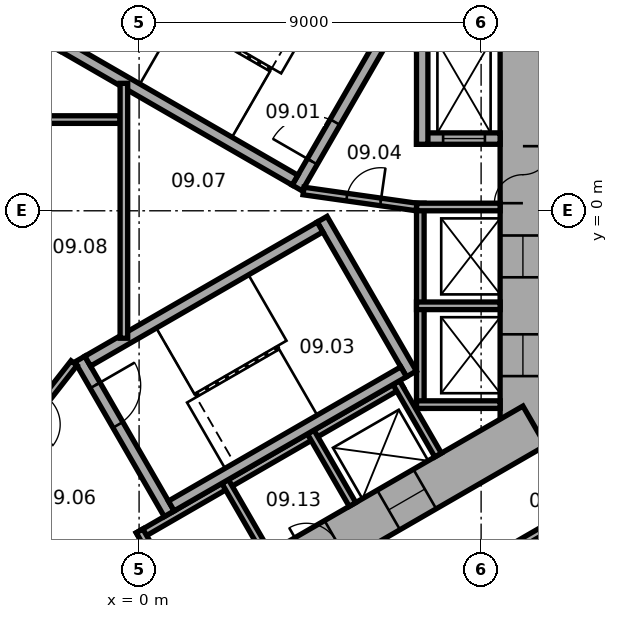
"""IFC4 building model, lengths in metres.
Left out: names, types, materials, properties, quantities, classifications, styles, units other than length and angle.
Written with IfcOpenShell. Run it as: python <this file> out.ifc"""

import sys

from ifc_helpers import new_model, si_unit, direction, frame, frame_2d, origin, place, context, subcontext, project, spatial, rectangle, extrude, element, fill, save


model = new_model("IFC4")
c1 = context("Model", 3, precision=1e-05, world=origin(), true_north=direction((0.0, 1.0)))
c2 = subcontext(c1, "Body", "Model", "MODEL_VIEW")
j1 = project(units=[si_unit("LENGTHUNIT", "METRE"), si_unit("PLANEANGLEUNIT", "RADIAN")], contexts=[c1])
p1 = place(None, origin())
s1 = spatial("IfcSite", under=j1, at=p1, CompositionType="ELEMENT")
p2 = place(p1, origin())
s2 = spatial("IfcBuilding", under=s1, at=p2, CompositionType="ELEMENT")
p3 = place(p2, frame((0.0, 0.0, 50.6)))
s3 = spatial("IfcBuildingStorey", under=s2, at=p3, CompositionType="ELEMENT", Elevation=50.6)
p4 = place(p3, frame((10.1, -6.177, 0.0), z_axis=(0.0, 0.0, 1.0), x_axis=(0.0, 1.0, 0.0)))
e1 = element("IfcWall", 1, at=p4, inside=s3, PredefinedType="SHEAR", context=c2, shape_type="SweptSolid", body=[
    extrude(rectangle(XDim=12.355, YDim=1.2, at=frame_2d((6.177, 0.0))), origin(), (0.0, 0.0, 1.0), 3.3),
])
p5 = place(p4, frame((6.378, 0.0, 0.0)))
e2 = element("IfcOpeningElement", 2, at=p5, cuts=e1, PredefinedType="OPENING", context=c2, shape_type="SweptSolid", body=[
    extrude(rectangle(XDim=1.5, YDim=2.1, at=frame_2d((0.75, 1.05))), frame((0.0, 0.61, 0.0), z_axis=(0.0, -1.0, 0.0), x_axis=(1.0, 0.0, 0.0)), (0.0, 0.0, 1.0), 1.22),
])
p6 = place(p4, frame((1.828, 0.0, 0.0)))
e3 = element("IfcOpeningElement", 3, at=p6, cuts=e1, PredefinedType="OPENING", context=c2, shape_type="SweptSolid", body=[
    extrude(rectangle(XDim=1.1, YDim=2.1, at=frame_2d((0.55, 1.05))), frame((0.0, 0.61, 0.0), z_axis=(0.0, -1.0, 0.0), x_axis=(1.0, 0.0, 0.0)), (0.0, 0.0, 1.0), 1.22),
])
p7 = place(p4, frame((4.427, 0.0, 0.0)))
e4 = element("IfcOpeningElement", 4, at=p7, cuts=e1, PredefinedType="OPENING", context=c2, shape_type="SweptSolid", body=[
    extrude(rectangle(XDim=1.1, YDim=2.1, at=frame_2d((0.55, 1.05))), frame((0.0, 0.61, 0.0), z_axis=(0.0, -1.0, 0.0), x_axis=(1.0, 0.0, 0.0)), (0.0, 0.0, 1.0), 1.22),
])
p8 = place(p3, frame((-10.4, -5.658, 0.0), z_axis=(0.0, 0.0, 1.0), x_axis=(0.866021384402, -0.500006961711, 0.0)))
e5 = element("IfcWall", 5, at=p8, inside=s3, PredefinedType="SHEAR", context=c2, shape_type="SweptSolid", body=[
    extrude(rectangle(XDim=12.355, YDim=1.2, at=frame_2d((6.178, 0.0))), origin(), (0.0, 0.0, 1.0), 3.3),
])
p9 = place(p8, frame((6.378, 0.0, 0.0)))
e6 = element("IfcOpeningElement", 6, at=p9, cuts=e5, PredefinedType="OPENING", context=c2, shape_type="SweptSolid", body=[
    extrude(rectangle(XDim=1.5, YDim=2.1, at=frame_2d((0.75, 1.05))), frame((0.0, 0.61, 0.0), z_axis=(0.0, -1.0, 0.0), x_axis=(1.0, 0.0, 0.0)), (0.0, 0.0, 1.0), 1.22),
])
p10 = place(p8, frame((3.228, 0.0, 0.0)))
e7 = element("IfcOpeningElement", 7, at=p10, cuts=e5, PredefinedType="OPENING", context=c2, shape_type="SweptSolid", body=[
    extrude(rectangle(XDim=0.9, YDim=2.1, at=frame_2d((0.45, 1.05))), frame((0.0, 0.61, 0.0), z_axis=(0.0, -1.0, 0.0), x_axis=(1.0, 0.0, 0.0)), (0.0, 0.0, 1.0), 1.22),
])
p11 = place(p3, frame((-0.3, -11.836, 0.0), z_axis=(0.0, 0.0, 1.0), x_axis=(0.866021384402, 0.500006961711, 0.0)))
e8 = element("IfcWall", 8, at=p11, inside=s3, PredefinedType="SHEAR", context=c2, shape_type="SweptSolid", body=[
    extrude(rectangle(XDim=12.355, YDim=1.2, at=frame_2d((6.178, 0.0))), origin(), (0.0, 0.0, 1.0), 3.3),
])
p12 = place(p11, frame((2.828, 0.0, 0.0)))
e9 = element("IfcOpeningElement", 9, at=p12, cuts=e8, PredefinedType="OPENING", context=c2, shape_type="SweptSolid", body=[
    extrude(rectangle(XDim=0.9, YDim=2.1, at=frame_2d((0.45, 1.05))), frame((0.0, 0.61, 0.0), z_axis=(0.0, -1.0, 0.0), x_axis=(1.0, 0.0, 0.0)), (0.0, 0.0, 1.0), 1.22),
])
p13 = place(p11, frame((5.428, 0.0, 0.0)))
e10 = element("IfcOpeningElement", 10, at=p13, cuts=e8, PredefinedType="OPENING", context=c2, shape_type="SweptSolid", body=[
    extrude(rectangle(XDim=0.9, YDim=2.1, at=frame_2d((0.45, 1.05))), frame((0.0, 0.61, 0.0), z_axis=(0.0, -1.0, 0.0), x_axis=(1.0, 0.0, 0.0)), (0.0, 0.0, 1.0), 1.22),
])
p14 = place(p11, frame((7.928, 0.0, 0.0)))
e11 = element("IfcOpeningElement", 11, at=p14, cuts=e8, PredefinedType="OPENING", context=c2, shape_type="SweptSolid", body=[
    extrude(rectangle(XDim=1.1, YDim=2.1, at=frame_2d((0.55, 1.05))), frame((0.0, 0.61, 0.0), z_axis=(0.0, -1.0, 0.0), x_axis=(1.0, 0.0, 0.0)), (0.0, 0.0, 1.0), 1.22),
])
p15 = place(p3, frame((7.4, -5.2, 0.0), z_axis=(0.0, 0.0, 1.0), x_axis=(0.0, 1.0, 0.0)))
e12 = element("IfcWall", 12, at=p15, inside=s3, PredefinedType="PARTITIONING", context=c2, shape_type="SweptSolid", body=[
    extrude(rectangle(XDim=5.4, YDim=0.2, at=frame_2d((2.7, 0.0))), origin(), (0.0, 0.0, 1.0), 3.05),
])
for number, where, z_axis, x_axis in (
    (13, (7.3, -5.1, 0.0), (0.0, 0.0, 1.0), (1.0, 0.0, 0.0)),
    (14, (7.3, -2.5, 0.0), (0.0, 0.0, 1.0), (1.0, 0.0, 0.0)),
    (15, (7.3, 0.1, 0.0), (0.0, 0.0, 1.0), (1.0, 0.0, 0.0)),
):
    element("IfcWall", number, at=place(p3, frame(where, z_axis=z_axis, x_axis=x_axis)), inside=s3, PredefinedType="PARTITIONING", context=c2, shape_type="SweptSolid", body=[
        extrude(rectangle(XDim=2.2, YDim=0.2, at=frame_2d((1.1, 0.0))), origin(), (0.0, 0.0, 1.0), 3.05),
    ])
p16 = place(p3, frame((7.424, 4.259, 0.0), z_axis=(0.0, 0.0, 1.0), x_axis=(-0.866026010844, 0.49999894854, 0.0)))
e16 = element("IfcWall", 16, at=p16, inside=s3, PredefinedType="PARTITIONING", context=c2, shape_type="SweptSolid", body=[
    extrude(rectangle(XDim=8.0, YDim=0.2, at=frame_2d((4.0, 0.0))), origin(), (0.0, 0.0, 1.0), 3.05),
])
p17 = place(p3, frame((7.287, 4.222, 0.0), z_axis=(0.0, 0.0, 1.0), x_axis=(0.499946605688, 0.86605622881, 0.0)))
e17 = element("IfcWall", 17, at=p17, inside=s3, PredefinedType="PARTITIONING", context=c2, shape_type="SweptSolid", body=[
    extrude(rectangle(XDim=2.2, YDim=0.2, at=frame_2d((1.1, 0.0))), origin(), (0.0, 0.0, 1.0), 3.05),
])
p18 = place(p3, frame((-0.024, -8.559, 0.0), z_axis=(0.0, 0.0, 1.0), x_axis=(0.866026010844, 0.49999894854, 0.0)))
e18 = element("IfcWall", 18, at=p18, inside=s3, PredefinedType="PARTITIONING", context=c2, shape_type="SweptSolid", body=[
    extrude(rectangle(XDim=8.0, YDim=0.2, at=frame_2d((4.0, 0.0))), origin(), (0.0, 0.0, 1.0), 3.05),
])
for number, where, z_axis, x_axis in (
    (19, (0.013, -8.422, 0.0), (0.0, 0.0, 1.0), (0.5, -0.866, 0.0)),
    (20, (2.264, -7.122, 0.0), (0.0, 0.0, 1.0), (0.5, -0.866, 0.0)),
    (21, (4.516, -5.822, 0.0), (0.0, 0.0, 1.0), (0.5, -0.866, 0.0)),
    (22, (6.768, -4.522, 0.0), (0.0, 0.0, 1.0), (0.5, -0.866, 0.0)),
):
    element("IfcWall", number, at=place(p3, frame(where, z_axis=z_axis, x_axis=x_axis)), inside=s3, PredefinedType="PARTITIONING", context=c2, shape_type="SweptSolid", body=[
        extrude(rectangle(XDim=2.2, YDim=0.2, at=frame_2d((1.1, 0.0))), origin(), (0.0, 0.0, 1.0), 3.05),
    ])
p19 = place(p3, frame((4.158, 0.602, 0.0), z_axis=(0.0, 0.0, 1.0), x_axis=(0.499977259774, 0.866038532462, 0.0)))
e23 = element("IfcWall", 23, at=p19, inside=s3, PredefinedType="SHEAR", context=c2, shape_type="SweptSolid", body=[
    extrude(rectangle(XDim=4.7, YDim=0.3, at=frame_2d((2.35, 0.0))), origin(), (0.0, 0.0, 1.0), 3.05),
])
p20 = place(p19, frame((0.8, 0.0, 0.0)))
e24 = element("IfcOpeningElement", 24, at=p20, cuts=e23, PredefinedType="OPENING", context=c2, shape_type="SweptSolid", body=[
    extrude(rectangle(XDim=1.2, YDim=2.1, at=frame_2d((0.6, 1.05))), frame((0.0, 0.16, 0.0), z_axis=(0.0, -1.0, 0.0), x_axis=(1.0, 0.0, 0.0)), (0.0, 0.0, 1.0), 0.32),
])
p21 = place(p3, frame((4.103, 0.807, 0.0), z_axis=(0.0, 0.0, 1.0), x_axis=(-0.866027801685, 0.499995846692, 0.0)))
e25 = element("IfcWall", 25, at=p21, inside=s3, PredefinedType="SHEAR", context=c2, shape_type="SweptSolid", body=[
    extrude(rectangle(XDim=7.06, YDim=0.3, at=frame_2d((3.53, 0.0))), origin(), (0.0, 0.0, 1.0), 3.05),
])
p22 = place(p3, frame((-1.558, -3.902, 0.0), z_axis=(0.0, 0.0, 1.0), x_axis=(0.499977259774, -0.866038532462, 0.0)))
e26 = element("IfcWall", 26, at=p22, inside=s3, PredefinedType="SHEAR", context=c2, shape_type="SweptSolid", body=[
    extrude(rectangle(XDim=4.7, YDim=0.3, at=frame_2d((2.35, 0.0))), origin(), (0.0, 0.0, 1.0), 3.05),
])
p23 = place(p22, frame((0.8, 0.0, 0.0)))
e27 = element("IfcOpeningElement", 27, at=p23, cuts=e26, PredefinedType="OPENING", context=c2, shape_type="SweptSolid", body=[
    extrude(rectangle(XDim=1.2, YDim=2.1, at=frame_2d((0.6, 1.05))), frame((0.0, 0.16, 0.0), z_axis=(0.0, -1.0, 0.0), x_axis=(1.0, 0.0, 0.0)), (0.0, 0.0, 1.0), 0.32),
])
p24 = place(p3, frame((4.816, -0.222, 0.0), z_axis=(0.0, 0.0, 1.0), x_axis=(0.499977259774, -0.866038532462, 0.0)))
e28 = element("IfcWall", 28, at=p24, inside=s3, PredefinedType="SHEAR", context=c2, shape_type="SweptSolid", body=[
    extrude(rectangle(XDim=4.7, YDim=0.3, at=frame_2d((2.35, 0.0))), origin(), (0.0, 0.0, 1.0), 3.05),
])
for number, where, z_axis, x_axis in (
    (29, (-1.353, -3.957, 0.0), (0.0, 0.0, 1.0), (0.866, 0.5, 0.0)),
    (30, (0.847, -7.767, 0.0), (0.0, 0.0, 1.0), (0.866, 0.5, 0.0)),
):
    element("IfcWall", number, at=place(p3, frame(where, z_axis=z_axis, x_axis=x_axis)), inside=s3, PredefinedType="SHEAR", context=c2, shape_type="SweptSolid", body=[
        extrude(rectangle(XDim=7.06, YDim=0.3, at=frame_2d((3.53, 0.0))), origin(), (0.0, 0.0, 1.0), 3.05),
    ])
p25 = place(p3, frame((7.3, 1.9, 0.0), z_axis=(0.0, 0.0, 1.0), x_axis=(1.0, 0.0, 0.0)))
e31 = element("IfcWall", 31, at=p25, inside=s3, PredefinedType="SHEAR", context=c2, shape_type="SweptSolid", body=[
    extrude(rectangle(XDim=2.2, YDim=0.3, at=frame_2d((1.1, 0.0))), origin(), (0.0, 0.0, 1.0), 3.05),
])
p26 = place(p25, frame((0.7, 0.0, 0.0)))
e32 = element("IfcOpeningElement", 32, at=p26, cuts=e31, PredefinedType="OPENING", context=c2, shape_type="SweptSolid", body=[
    extrude(rectangle(XDim=1.1, YDim=2.1, at=frame_2d((0.55, 1.05))), frame((0.0, 0.16, 0.0), z_axis=(0.0, -1.0, 0.0), x_axis=(1.0, 0.0, 0.0)), (0.0, 0.0, 1.0), 0.32),
])
p27 = place(p3, frame((7.45, 1.75, 0.0), z_axis=(0.0, 0.0, 1.0), x_axis=(0.0, 1.0, 0.0)))
e33 = element("IfcWall", 33, at=p27, inside=s3, PredefinedType="SHEAR", context=c2, shape_type="SweptSolid", body=[
    extrude(rectangle(XDim=3.35, YDim=0.3, at=frame_2d((1.675, 0.0))), origin(), (0.0, 0.0, 1.0), 3.05),
])
p28 = place(p3, frame((4.327, 0.521, 0.0), z_axis=(0.0, 0.0, 1.0), x_axis=(0.990124376366, -0.14019172346, 0.0)))
e34 = element("IfcWall", 34, at=p28, inside=s3, PredefinedType="PARTITIONING", context=c2, shape_type="SweptSolid", body=[
    extrude(rectangle(XDim=3.002, YDim=0.2, at=frame_2d((1.501, 0.0))), origin(), (0.0, 0.0, 1.0), 3.05),
])
p29 = place(p28, frame((1.15, 0.0, 0.0)))
e35 = element("IfcOpeningElement", 35, at=p29, cuts=e34, PredefinedType="OPENING", context=c2, shape_type="SweptSolid", body=[
    extrude(rectangle(XDim=0.9, YDim=2.1, at=frame_2d((0.45, 1.05))), frame((0.0, 0.11, 0.0), z_axis=(0.0, -1.0, 0.0), x_axis=(1.0, 0.0, 0.0)), (0.0, 0.0, 1.0), 0.22),
])
p30 = place(p3, frame((-1.712, -4.008, 0.0), z_axis=(0.0, 0.0, 1.0), x_axis=(-0.616549420702, -0.787316208287, 0.0)))
e36 = element("IfcWall", 36, at=p30, inside=s3, PredefinedType="PARTITIONING", context=c2, shape_type="SweptSolid", body=[
    extrude(rectangle(XDim=3.002, YDim=0.2, at=frame_2d((1.501, 0.0))), origin(), (0.0, 0.0, 1.0), 3.05),
])
p31 = place(p30, frame((1.15, 0.0, 0.0)))
e37 = element("IfcOpeningElement", 37, at=p31, cuts=e36, PredefinedType="OPENING", context=c2, shape_type="SweptSolid", body=[
    extrude(rectangle(XDim=0.9, YDim=2.1, at=frame_2d((0.45, 1.05))), frame((0.0, 0.11, 0.0), z_axis=(0.0, -1.0, 0.0), x_axis=(1.0, 0.0, 0.0)), (0.0, 0.0, 1.0), 0.22),
])
p32 = place(p3, frame((-2.72, 2.4, 0.0), z_axis=(0.0, 0.0, 1.0), x_axis=(1.0, 0.0, 0.0)))
e38 = element("IfcWall", 38, at=p32, inside=s3, PredefinedType="PARTITIONING", context=c2, shape_type="SweptSolid", body=[
    extrude(rectangle(XDim=2.22, YDim=0.2, at=frame_2d((1.11, 0.0))), origin(), (0.0, 0.0, 1.0), 3.05),
])
p33 = place(p3, frame((-0.4, -3.353, 0.0), z_axis=(0.0, 0.0, 1.0), x_axis=(0.0, 1.0, 0.0)))
e39 = element("IfcWall", 39, at=p33, inside=s3, PredefinedType="PARTITIONING", context=c2, shape_type="SweptSolid", body=[
    extrude(rectangle(XDim=6.707, YDim=0.2, at=frame_2d((3.353, 0.0))), origin(), (0.0, 0.0, 1.0), 3.05),
])
p34 = place(p3, frame((-11.615, -7.843, 0.0), z_axis=(0.0, 0.0, 1.0), x_axis=(0.866026466995, -0.499998158461, 0.0)))
e40 = element("IfcWall", 40, at=p34, inside=s3, PredefinedType="PARTITIONING", context=c2, shape_type="SweptSolid", body=[
    extrude(rectangle(XDim=12.315, YDim=0.2, at=frame_2d((6.158, 0.0))), origin(), (0.0, 0.0, 1.0), 3.05),
])
p35 = place(p34, frame((1.665, 0.0, 0.0)))
e41 = element("IfcOpeningElement", 41, at=p35, cuts=e40, PredefinedType="OPENING", context=c2, shape_type="SweptSolid", body=[
    extrude(rectangle(XDim=0.9, YDim=2.1, at=frame_2d((0.45, 1.05))), frame((0.0, 0.11, 0.0), z_axis=(0.0, -1.0, 0.0), x_axis=(1.0, 0.0, 0.0)), (0.0, 0.0, 1.0), 0.22),
])
p36 = place(p34, frame((9.787, 0.0, 0.0)))
e42 = element("IfcOpeningElement", 42, at=p36, cuts=e40, PredefinedType="OPENING", context=c2, shape_type="SweptSolid", body=[
    extrude(rectangle(XDim=0.9, YDim=2.1, at=frame_2d((0.45, 1.05))), frame((0.0, 0.11, 0.0), z_axis=(0.0, -1.0, 0.0), x_axis=(1.0, 0.0, 0.0)), (0.0, 0.0, 1.0), 0.22),
])
p37 = place(p3, frame((9.852, -8.861, 0.0), z_axis=(0.0, 0.0, 1.0), x_axis=(0.866013291437, 0.500020978615, 0.0)))
e43 = element("IfcWall", 43, at=p37, inside=s3, PredefinedType="PARTITIONING", context=c2, shape_type="SweptSolid", body=[
    extrude(rectangle(XDim=2.077, YDim=0.2, at=frame_2d((1.038, 0.0))), origin(), (0.0, 0.0, 1.0), 3.05),
])
p38 = place(p5, origin())
e44 = element("IfcDoor", 44, at=p38, inside=s3, OperationType="DOUBLE_DOOR_SINGLE_SWING", PredefinedType="DOOR", context=c2, shape_type="SweptSolid", body=[
    extrude(rectangle(XDim=1.5, YDim=2.1, at=frame_2d((0.75, 1.05))), frame((0.0, 0.025, 0.0), z_axis=(0.0, -1.0, 0.0), x_axis=(1.0, 0.0, 0.0)), (0.0, 0.0, 1.0), 0.05),
])
fill(e2, e44)
p39 = place(p20, origin())
e45 = element("IfcDoor", 45, at=p39, inside=s3, OperationType="SINGLE_SWING_RIGHT", PredefinedType="DOOR", context=c2, shape_type="SweptSolid", body=[
    extrude(rectangle(XDim=1.2, YDim=2.1, at=frame_2d((0.6, 1.05))), frame((0.0, 0.025, 0.0), z_axis=(0.0, -1.0, 0.0), x_axis=(1.0, 0.0, 0.0)), (0.0, 0.0, 1.0), 0.05),
])
fill(e24, e45)
p40 = place(p23, origin())
e46 = element("IfcDoor", 46, at=p40, inside=s3, OperationType="SINGLE_SWING_RIGHT", PredefinedType="DOOR", context=c2, shape_type="SweptSolid", body=[
    extrude(rectangle(XDim=1.2, YDim=2.1, at=frame_2d((0.6, 1.05))), frame((0.0, 0.025, 0.0), z_axis=(0.0, -1.0, 0.0), x_axis=(1.0, 0.0, 0.0)), (0.0, 0.0, 1.0), 0.05),
])
fill(e27, e46)
p41 = place(p29, origin())
e47 = element("IfcDoor", 47, at=p41, inside=s3, OperationType="SINGLE_SWING_LEFT", PredefinedType="DOOR", context=c2, shape_type="SweptSolid", body=[
    extrude(rectangle(XDim=0.9, YDim=2.1, at=frame_2d((0.45, 1.05))), frame((0.0, 0.025, 0.0), z_axis=(0.0, -1.0, 0.0), x_axis=(1.0, 0.0, 0.0)), (0.0, 0.0, 1.0), 0.05),
])
fill(e35, e47)
p42 = place(p26, origin())
e48 = element("IfcDoor", 48, at=p42, inside=s3, OperationType="DOUBLE_DOOR_SLIDING", PredefinedType="DOOR", context=c2, shape_type="SweptSolid", body=[
    extrude(rectangle(XDim=1.1, YDim=2.1, at=frame_2d((0.55, 1.05))), frame((0.0, 0.025, 0.0), z_axis=(0.0, -1.0, 0.0), x_axis=(1.0, 0.0, 0.0)), (0.0, 0.0, 1.0), 0.05),
])
fill(e32, e48)
p43 = place(p6, origin())
e49 = element("IfcDoor", 49, at=p43, inside=s3, OperationType="DOUBLE_DOOR_SLIDING", PredefinedType="DOOR", context=c2, shape_type="SweptSolid", body=[
    extrude(rectangle(XDim=1.1, YDim=2.1, at=frame_2d((0.55, 1.05))), frame((0.0, 0.025, 0.0), z_axis=(0.0, -1.0, 0.0), x_axis=(1.0, 0.0, 0.0)), (0.0, 0.0, 1.0), 0.05),
])
fill(e3, e49)
p44 = place(p7, origin())
e50 = element("IfcDoor", 50, at=p44, inside=s3, OperationType="DOUBLE_DOOR_SLIDING", PredefinedType="DOOR", context=c2, shape_type="SweptSolid", body=[
    extrude(rectangle(XDim=1.1, YDim=2.1, at=frame_2d((0.55, 1.05))), frame((0.0, 0.025, 0.0), z_axis=(0.0, -1.0, 0.0), x_axis=(1.0, 0.0, 0.0)), (0.0, 0.0, 1.0), 0.05),
])
fill(e4, e50)
p45 = place(p14, origin())
e51 = element("IfcDoor", 51, at=p45, inside=s3, OperationType="DOUBLE_DOOR_SLIDING", PredefinedType="DOOR", context=c2, shape_type="SweptSolid", body=[
    extrude(rectangle(XDim=1.1, YDim=2.1, at=frame_2d((0.55, 1.05))), frame((0.0, 0.025, 0.0), z_axis=(0.0, -1.0, 0.0), x_axis=(1.0, 0.0, 0.0)), (0.0, 0.0, 1.0), 0.05),
])
fill(e11, e51)
save(model, sys.argv[1])
